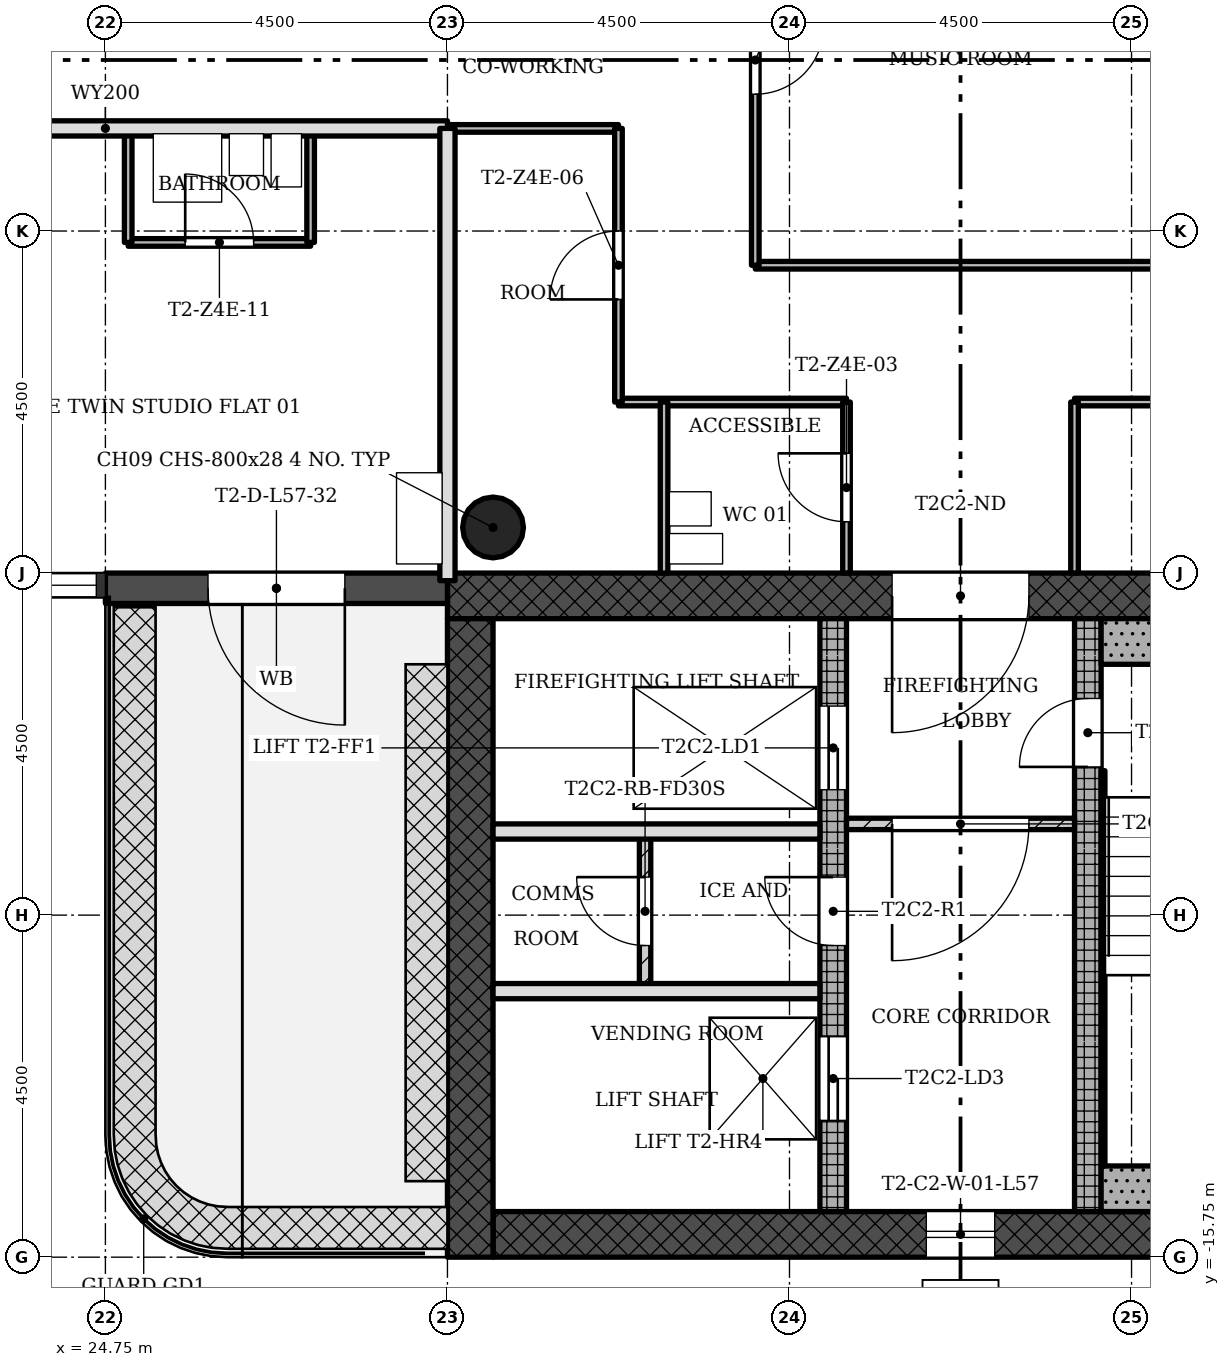
"""IFC4 building model, lengths in metres.
Left out: names, types, materials, properties, quantities, classifications, styles, units other than length and angle.
Written with IfcOpenShell. Run it as: python <this file> out.ifc"""

import sys

from ifc_helpers import new_model, si_unit, direction, frame, frame_2d, origin, origin_2d, place, context, subcontext, project, spatial, rectangle, hollow_circle, extrude, element, fill, save


model = new_model("IFC4")
c1 = context("Model", 3, precision=1e-05, world=origin(), true_north=direction((0.0, 1.0)))
c2 = subcontext(c1, "Body", "Model", "MODEL_VIEW")
j1 = project(units=[si_unit("LENGTHUNIT", "METRE"), si_unit("PLANEANGLEUNIT", "RADIAN")], contexts=[c1])
p1 = place(None, origin())
s1 = spatial("IfcSite", under=j1, at=p1, CompositionType="ELEMENT")
p2 = place(p1, origin())
s2 = spatial("IfcBuilding", under=s1, at=p2, CompositionType="ELEMENT")
p3 = place(p2, frame((0.0, 0.0, 206.2)))
s3 = spatial("IfcBuildingStorey", under=s2, at=p3, CompositionType="ELEMENT", Elevation=206.2)
p4 = place(p3, frame((29.85, -15.45, 0.0), z_axis=(0.0, 0.0, 1.0), x_axis=(1.0, 0.0, 0.0)))
e1 = element("IfcWall", 1, at=p4, inside=s3, PredefinedType="SHEAR", context=c2, shape_type="SweptSolid", body=[
    extrude(rectangle(XDim=12.9, YDim=0.6, at=frame_2d((6.45, 0.0))), origin(), (0.0, 0.0, 1.0), 3.4),
])
p5 = place(p4, frame((5.7, 0.0, 0.45)))
e2 = element("IfcOpeningElement", 2, at=p5, cuts=e1, PredefinedType="OPENING", context=c2, shape_type="SweptSolid", body=[
    extrude(rectangle(XDim=0.9, YDim=2.4, at=frame_2d((0.45, 1.2))), frame((0.0, 0.31, 0.0), z_axis=(0.0, -1.0, 0.0), x_axis=(1.0, 0.0, 0.0)), (0.0, 0.0, 1.0), 0.62),
])
p6 = place(p3, frame((42.15, -7.05, 0.0), z_axis=(0.0, 0.0, 1.0), x_axis=(-1.0, 0.0, 0.0)))
e3 = element("IfcWall", 3, at=p6, inside=s3, PredefinedType="SHEAR", context=c2, shape_type="SweptSolid", body=[
    extrude(rectangle(XDim=12.9, YDim=0.6, at=frame_2d((6.45, 0.0))), origin(), (0.0, 0.0, 1.0), 3.4),
])
p7 = place(p6, frame((5.25, 0.0, 0.0)))
e4 = element("IfcOpeningElement", 4, at=p7, cuts=e3, PredefinedType="OPENING", context=c2, shape_type="SweptSolid", body=[
    extrude(rectangle(XDim=1.8, YDim=2.1, at=frame_2d((0.9, 1.05))), frame((0.0, 0.31, 0.0), z_axis=(0.0, -1.0, 0.0), x_axis=(1.0, 0.0, 0.0)), (0.0, 0.0, 1.0), 0.62),
])
p8 = place(p3, frame((29.55, -7.35, 0.0), z_axis=(0.0, 0.0, 1.0), x_axis=(0.0, -1.0, 0.0)))
e5 = element("IfcWall", 5, at=p8, inside=s3, PredefinedType="SHEAR", context=c2, shape_type="SweptSolid", body=[
    extrude(rectangle(XDim=8.4, YDim=0.6, at=frame_2d((4.2, 0.0))), origin(), (0.0, 0.0, 1.0), 3.4),
])
p9 = place(p3, frame((34.325, -15.15, 0.0), z_axis=(0.0, 0.0, 1.0), x_axis=(0.0, 1.0, 0.0)))
e6 = element("IfcWall", 6, at=p9, inside=s3, PredefinedType="SHEAR", context=c2, shape_type="SweptSolid", body=[
    extrude(rectangle(XDim=7.8, YDim=0.35, at=frame_2d((3.9, 0.0))), origin(), (0.0, 0.0, 1.0), 3.4),
])
p10 = place(p9, frame((5.55, 0.0, 0.0)))
e7 = element("IfcOpeningElement", 7, at=p10, cuts=e6, PredefinedType="OPENING", context=c2, shape_type="SweptSolid", body=[
    extrude(rectangle(XDim=1.1, YDim=2.1, at=frame_2d((0.55, 1.05))), frame((0.0, 0.185, 0.0), z_axis=(0.0, -1.0, 0.0), x_axis=(1.0, 0.0, 0.0)), (0.0, 0.0, 1.0), 0.37),
])
p11 = place(p9, frame((1.2, 0.0, 0.0)))
e8 = element("IfcOpeningElement", 8, at=p11, cuts=e6, PredefinedType="OPENING", context=c2, shape_type="SweptSolid", body=[
    extrude(rectangle(XDim=1.1, YDim=2.1, at=frame_2d((0.55, 1.05))), frame((0.0, 0.185, 0.0), z_axis=(0.0, -1.0, 0.0), x_axis=(1.0, 0.0, 0.0)), (0.0, 0.0, 1.0), 0.37),
])
p12 = place(p9, frame((3.5, 0.0, 0.0)))
e9 = element("IfcOpeningElement", 9, at=p12, cuts=e6, PredefinedType="OPENING", context=c2, shape_type="SweptSolid", body=[
    extrude(rectangle(XDim=0.9, YDim=2.1, at=frame_2d((0.45, 1.05))), frame((0.0, 0.185, 0.0), z_axis=(0.0, -1.0, 0.0), x_axis=(1.0, 0.0, 0.0)), (0.0, 0.0, 1.0), 0.37),
])
p13 = place(p3, frame((37.675, -15.15, 0.0), z_axis=(0.0, 0.0, 1.0), x_axis=(0.0, 1.0, 0.0)))
e10 = element("IfcWall", 10, at=p13, inside=s3, PredefinedType="SHEAR", context=c2, shape_type="SweptSolid", body=[
    extrude(rectangle(XDim=7.8, YDim=0.35, at=frame_2d((3.9, 0.0))), origin(), (0.0, 0.0, 1.0), 3.4),
])
p14 = place(p13, frame((5.85, 0.0, 0.0)))
e11 = element("IfcOpeningElement", 11, at=p14, cuts=e10, PredefinedType="OPENING", context=c2, shape_type="SweptSolid", body=[
    extrude(rectangle(XDim=0.9, YDim=2.1, at=frame_2d((0.45, 1.05))), frame((0.0, 0.185, 0.0), z_axis=(0.0, -1.0, 0.0), x_axis=(1.0, 0.0, 0.0)), (0.0, 0.0, 1.0), 0.37),
])
p15 = place(p3, frame((29.85, -6.15, 0.0), z_axis=(0.0, 0.0, 1.0), x_axis=(1.0, 0.0, 0.0)))
e12 = element("IfcColumn", 12, at=p15, inside=s3, PredefinedType="COLUMN", context=c2, shape_type="SweptSolid", body=[
    extrude(hollow_circle(Radius=0.4, WallThickness=0.028, at=origin_2d()), origin(), (0.0, 0.0, 1.0), 3.4),
])
p16 = place(p3, frame((24.75, -6.95, -0.02), z_axis=(0.0, 0.0, 1.0), x_axis=(1.0, 0.0, 0.0)))
e13 = element("IfcWall", 13, at=p16, inside=s3, PredefinedType="STANDARD", context=c2, shape_type="SweptSolid", body=[
    extrude(rectangle(XDim=4.5, YDim=0.4, at=frame_2d((2.25, 0.0))), origin(), (0.0, 0.0, 1.0), 3.12),
])
p17 = place(p16, frame((1.35, 0.0, 0.02)))
e14 = element("IfcOpeningElement", 14, at=p17, cuts=e13, PredefinedType="OPENING", context=c2, shape_type="SweptSolid", body=[
    extrude(rectangle(XDim=1.8, YDim=2.1, at=frame_2d((0.9, 1.05))), frame((0.0, 0.21, 0.0), z_axis=(0.0, -1.0, 0.0), x_axis=(1.0, 0.0, 0.0)), (0.0, 0.0, 1.0), 0.42),
])
p18 = place(p3, frame((34.5, -10.05, 0.0), z_axis=(0.0, 0.0, 1.0), x_axis=(1.0, 0.0, 0.0)))
e15 = element("IfcWall", 15, at=p18, inside=s3, PredefinedType="PARTITIONING", context=c2, shape_type="SweptSolid", body=[
    extrude(rectangle(XDim=3.0, YDim=0.15, at=frame_2d((1.5, 0.0))), origin(), (0.0, 0.0, 1.0), 3.0),
])
p19 = place(p18, frame((0.6, 0.0, 0.0)))
e16 = element("IfcOpeningElement", 16, at=p19, cuts=e15, PredefinedType="OPENING", context=c2, shape_type="SweptSolid", body=[
    extrude(rectangle(XDim=1.8, YDim=2.1, at=frame_2d((0.9, 1.05))), frame((0.0, 0.085, 0.0), z_axis=(0.0, -1.0, 0.0), x_axis=(1.0, 0.0, 0.0)), (0.0, 0.0, 1.0), 0.17),
])
for number, where, z_axis, x_axis in (
    (17, (29.85, -12.25, 0.0), (0.0, 0.0, 1.0), (1.0, 0.0, 0.0)),
    (18, (29.85, -10.15, 0.0), (0.0, 0.0, 1.0), (1.0, 0.0, 0.0)),
):
    element("IfcWall", number, at=place(p3, frame(where, z_axis=z_axis, x_axis=x_axis)), inside=s3, PredefinedType="SOLIDWALL", context=c2, shape_type="SweptSolid", body=[
        extrude(rectangle(XDim=4.3, YDim=0.2, at=frame_2d((2.15, 0.0))), origin(), (0.0, 0.0, 1.0), 3.0),
    ])
p20 = place(p3, frame((31.85, -10.15, 0.0), z_axis=(0.0, 0.0, 1.0), x_axis=(0.0, -1.0, 0.0)))
e19 = element("IfcWall", 19, at=p20, inside=s3, PredefinedType="PARTITIONING", context=c2, shape_type="SweptSolid", body=[
    extrude(rectangle(XDim=2.1, YDim=0.15, at=frame_2d((1.05, 0.0))), origin(), (0.0, 0.0, 1.0), 3.0),
])
p21 = place(p20, frame((0.6, 0.0, 0.0)))
e20 = element("IfcOpeningElement", 20, at=p21, cuts=e19, PredefinedType="OPENING", context=c2, shape_type="SweptSolid", body=[
    extrude(rectangle(XDim=0.9, YDim=2.1, at=frame_2d((0.45, 1.05))), frame((0.0, 0.085, 0.0), z_axis=(0.0, -1.0, 0.0), x_axis=(1.0, 0.0, 0.0)), (0.0, 0.0, 1.0), 0.17),
])
for number, where, z_axis, x_axis in (
    (21, (40.5, -4.5, 0.0), (0.0, 0.0, 1.0), (-1.0, 0.0, 0.0)),
    (22, (34.5, -4.5, 0.0), (0.0, 0.0, 1.0), (-1.0, 0.0, 0.0)),
):
    element("IfcWall", number, at=place(p3, frame(where, z_axis=z_axis, x_axis=x_axis)), inside=s3, PredefinedType="PARTITIONING", context=c2, shape_type="SweptSolid", body=[
        extrude(rectangle(XDim=3.0, YDim=0.1, at=frame_2d((1.5, 0.0))), origin(), (0.0, 0.0, 1.0), 3.0),
    ])
p22 = place(p3, frame((38.7, -2.7, 0.0), z_axis=(0.0, 0.0, 1.0), x_axis=(-1.0, 0.0, 0.0)))
e23 = element("IfcWall", 23, at=p22, inside=s3, PredefinedType="PARTITIONING", context=c2, shape_type="SweptSolid", body=[
    extrude(rectangle(XDim=5.4, YDim=0.1, at=frame_2d((2.7, 0.0))), origin(), (0.0, 0.0, 1.0), 3.0),
])
p23 = place(p3, frame((27.45, -2.4, 0.0), z_axis=(0.0, 0.0, 1.0), x_axis=(-1.0, 0.0, 0.0)))
e24 = element("IfcWall", 24, at=p23, inside=s3, PredefinedType="PARTITIONING", context=c2, shape_type="SweptSolid", body=[
    extrude(rectangle(XDim=2.4, YDim=0.1, at=frame_2d((1.2, 0.0))), origin(), (0.0, 0.0, 1.0), 3.0),
])
p24 = place(p23, frame((0.75, 0.0, 0.0)))
e25 = element("IfcOpeningElement", 25, at=p24, cuts=e24, PredefinedType="OPENING", context=c2, shape_type="SweptSolid", body=[
    extrude(rectangle(XDim=0.9, YDim=2.1, at=frame_2d((0.45, 1.05))), frame((0.0, 0.06, 0.0), z_axis=(0.0, -1.0, 0.0), x_axis=(1.0, 0.0, 0.0)), (0.0, 0.0, 1.0), 0.12),
])
p25 = place(p3, frame((31.5, -0.9, 0.0), z_axis=(0.0, 0.0, 1.0), x_axis=(-1.0, 0.0, 0.0)))
e26 = element("IfcWall", 26, at=p25, inside=s3, PredefinedType="PARTITIONING", context=c2, shape_type="SweptSolid", body=[
    extrude(rectangle(XDim=2.25, YDim=0.1, at=frame_2d((1.125, 0.0))), origin(), (0.0, 0.0, 1.0), 3.0),
])
p26 = place(p3, frame((29.25, -0.9, 0.0), z_axis=(0.0, 0.0, 1.0), x_axis=(-1.0, 0.0, 0.0)))
e27 = element("IfcWall", 27, at=p26, inside=s3, PredefinedType="SOLIDWALL", context=c2, shape_type="SweptSolid", body=[
    extrude(rectangle(XDim=9.0, YDim=0.2, at=frame_2d((4.5, 0.0))), origin(), (0.0, 0.0, 1.0), 3.0),
])
p27 = place(p26, frame((6.15, 0.0, 0.0)))
e28 = element("IfcOpeningElement", 28, at=p27, cuts=e27, PredefinedType="OPENING", context=c2, shape_type="SweptSolid", body=[
    extrude(rectangle(XDim=0.9, YDim=2.1, at=frame_2d((0.45, 1.05))), frame((0.0, 0.11, 0.0), z_axis=(0.0, -1.0, 0.0), x_axis=(1.0, 0.0, 0.0)), (0.0, 0.0, 1.0), 0.22),
])
p28 = place(p3, frame((37.5, -6.75, 0.0), z_axis=(0.0, 0.0, 1.0), x_axis=(0.0, 1.0, 0.0)))
e29 = element("IfcWall", 29, at=p28, inside=s3, PredefinedType="PARTITIONING", context=c2, shape_type="SweptSolid", body=[
    extrude(rectangle(XDim=2.25, YDim=0.1, at=frame_2d((1.125, 0.0))), origin(), (0.0, 0.0, 1.0), 3.0),
])
p29 = place(p3, frame((34.5, -6.75, 0.0), z_axis=(0.0, 0.0, 1.0), x_axis=(0.0, 1.0, 0.0)))
e30 = element("IfcWall", 30, at=p29, inside=s3, PredefinedType="PARTITIONING", context=c2, shape_type="SweptSolid", body=[
    extrude(rectangle(XDim=2.25, YDim=0.1, at=frame_2d((1.125, 0.0))), origin(), (0.0, 0.0, 1.0), 3.0),
])
p30 = place(p29, frame((0.675, 0.0, 0.0)))
e31 = element("IfcOpeningElement", 31, at=p30, cuts=e30, PredefinedType="OPENING", context=c2, shape_type="SweptSolid", body=[
    extrude(rectangle(XDim=0.9, YDim=2.1, at=frame_2d((0.45, 1.05))), frame((0.0, 0.06, 0.0), z_axis=(0.0, -1.0, 0.0), x_axis=(1.0, 0.0, 0.0)), (0.0, 0.0, 1.0), 0.12),
])
p31 = place(p3, frame((33.3, -2.7, 0.0), z_axis=(0.0, 0.0, 1.0), x_axis=(0.0, 1.0, 0.0)))
e32 = element("IfcWall", 32, at=p31, inside=s3, PredefinedType="PARTITIONING", context=c2, shape_type="SweptSolid", body=[
    extrude(rectangle(XDim=5.4, YDim=0.1, at=frame_2d((2.7, 0.0))), origin(), (0.0, 0.0, 1.0), 3.0),
])
p32 = place(p31, frame((2.25, 0.0, 0.0)))
e33 = element("IfcOpeningElement", 33, at=p32, cuts=e32, PredefinedType="OPENING", context=c2, shape_type="SweptSolid", body=[
    extrude(rectangle(XDim=0.9, YDim=2.1, at=frame_2d((0.45, 1.05))), frame((0.0, 0.06, 0.0), z_axis=(0.0, -1.0, 0.0), x_axis=(1.0, 0.0, 0.0)), (0.0, 0.0, 1.0), 0.12),
])
p33 = place(p3, frame((32.1, -6.75, 0.0), z_axis=(0.0, 0.0, 1.0), x_axis=(0.0, 1.0, 0.0)))
e34 = element("IfcWall", 34, at=p33, inside=s3, PredefinedType="PARTITIONING", context=c2, shape_type="SweptSolid", body=[
    extrude(rectangle(XDim=2.25, YDim=0.1, at=frame_2d((1.125, 0.0))), origin(), (0.0, 0.0, 1.0), 3.0),
])
p34 = place(p3, frame((31.5, -4.5, 0.0), z_axis=(0.0, 0.0, 1.0), x_axis=(0.0, 1.0, 0.0)))
e35 = element("IfcWall", 35, at=p34, inside=s3, PredefinedType="PARTITIONING", context=c2, shape_type="SweptSolid", body=[
    extrude(rectangle(XDim=3.6, YDim=0.1, at=frame_2d((1.8, 0.0))), origin(), (0.0, 0.0, 1.0), 3.0),
])
p35 = place(p34, frame((1.35, 0.0, 0.0)))
e36 = element("IfcOpeningElement", 36, at=p35, cuts=e35, PredefinedType="OPENING", context=c2, shape_type="SweptSolid", body=[
    extrude(rectangle(XDim=0.9, YDim=2.1, at=frame_2d((0.45, 1.05))), frame((0.0, 0.06, 0.0), z_axis=(0.0, -1.0, 0.0), x_axis=(1.0, 0.0, 0.0)), (0.0, 0.0, 1.0), 0.12),
])
p36 = place(p3, frame((29.25, -6.85, 0.0), z_axis=(0.0, 0.0, 1.0), x_axis=(0.0, 1.0, 0.0)))
e37 = element("IfcWall", 37, at=p36, inside=s3, PredefinedType="SOLIDWALL", context=c2, shape_type="SweptSolid", body=[
    extrude(rectangle(XDim=5.95, YDim=0.2, at=frame_2d((2.975, 0.0))), origin(), (0.0, 0.0, 1.0), 3.0),
])
for number, where, z_axis, x_axis in (
    (38, (27.45, -2.4, 0.0), (0.0, 0.0, 1.0), (0.0, 1.0, 0.0)),
    (39, (25.05, -2.4, 0.0), (0.0, 0.0, 1.0), (0.0, 1.0, 0.0)),
):
    element("IfcWall", number, at=place(p3, frame(where, z_axis=z_axis, x_axis=x_axis)), inside=s3, PredefinedType="PARTITIONING", context=c2, shape_type="SweptSolid", body=[
        extrude(rectangle(XDim=1.5, YDim=0.1, at=frame_2d((0.75, 0.0))), origin(), (0.0, 0.0, 1.0), 3.0),
    ])
for number, where, z_axis, x_axis in (
    (40, (37.85, -14.85, 0.0), (0.0, 0.0, 1.0), (1.0, 0.0, 0.0)),
    (41, (37.85, -7.65, 0.0), (0.0, 0.0, 1.0), (1.0, 0.0, 0.0)),
):
    element("IfcWall", number, at=place(p3, frame(where, z_axis=z_axis, x_axis=x_axis)), inside=s3, PredefinedType="SHEAR", context=c2, shape_type="SweptSolid", body=[
        extrude(rectangle(XDim=4.3, YDim=0.6, at=frame_2d((2.15, 0.0))), origin(), (0.0, 0.0, 1.0), 3.4),
    ])
p37 = place(p3, frame((37.875, -9.35, 0.0), z_axis=(0.0, 0.0, 1.0), x_axis=(0.0, -1.0, 0.0)))
e42 = element("IfcWall", 42, at=p37, inside=s3, PredefinedType="SHEAR", context=c2, shape_type="SweptSolid", body=[
    extrude(rectangle(XDim=5.2, YDim=0.05, at=frame_2d((2.6, 0.0))), origin(), (0.0, 0.0, 1.0), 3.4),
])
p38 = place(p17, origin())
e43 = element("IfcDoor", 43, at=p38, inside=s3, OperationType="SINGLE_SWING_RIGHT", PredefinedType="DOOR", context=c2, shape_type="SweptSolid", body=[
    extrude(rectangle(XDim=1.8, YDim=2.1, at=frame_2d((0.9, 1.05))), frame((0.0, 0.025, 0.0), z_axis=(0.0, -1.0, 0.0), x_axis=(1.0, 0.0, 0.0)), (0.0, 0.0, 1.0), 0.05),
])
fill(e14, e43)
p39 = place(p5, origin())
e44 = element("IfcWindow", 44, at=p39, inside=s3, PartitioningType="SINGLE_PANEL", PredefinedType="WINDOW", context=c2, shape_type="SweptSolid", body=[
    extrude(rectangle(XDim=0.9, YDim=2.4, at=frame_2d((0.45, 1.2))), frame((0.0, 0.03, 0.0), z_axis=(0.0, -1.0, 0.0), x_axis=(1.0, 0.0, 0.0)), (0.0, 0.0, 1.0), 0.06),
])
fill(e2, e44)
p40 = place(p19, origin())
e45 = element("IfcDoor", 45, at=p40, inside=s3, OperationType="SINGLE_SWING_LEFT", PredefinedType="DOOR", context=c2, shape_type="SweptSolid", body=[
    extrude(rectangle(XDim=1.8, YDim=2.1, at=frame_2d((0.9, 1.05))), frame((0.0, 0.025, 0.0), z_axis=(0.0, -1.0, 0.0), x_axis=(1.0, 0.0, 0.0)), (0.0, 0.0, 1.0), 0.05),
])
fill(e16, e45)
p41 = place(p21, origin())
e46 = element("IfcDoor", 46, at=p41, inside=s3, OperationType="SINGLE_SWING_LEFT", PredefinedType="DOOR", context=c2, shape_type="SweptSolid", body=[
    extrude(rectangle(XDim=0.9, YDim=2.1, at=frame_2d((0.45, 1.05))), frame((0.0, 0.025, 0.0), z_axis=(0.0, -1.0, 0.0), x_axis=(1.0, 0.0, 0.0)), (0.0, 0.0, 1.0), 0.05),
])
fill(e20, e46)
p42 = place(p32, origin())
e47 = element("IfcDoor", 47, at=p42, inside=s3, OperationType="SINGLE_SWING_RIGHT", PredefinedType="DOOR", context=c2, shape_type="SweptSolid", body=[
    extrude(rectangle(XDim=0.9, YDim=2.1, at=frame_2d((0.45, 1.05))), frame((0.0, 0.025, 0.0), z_axis=(0.0, -1.0, 0.0), x_axis=(1.0, 0.0, 0.0)), (0.0, 0.0, 1.0), 0.05),
])
fill(e33, e47)
p43 = place(p30, origin())
e48 = element("IfcDoor", 48, at=p43, inside=s3, OperationType="SINGLE_SWING_LEFT", PredefinedType="DOOR", context=c2, shape_type="SweptSolid", body=[
    extrude(rectangle(XDim=0.9, YDim=2.1, at=frame_2d((0.45, 1.05))), frame((0.0, 0.025, 0.0), z_axis=(0.0, -1.0, 0.0), x_axis=(1.0, 0.0, 0.0)), (0.0, 0.0, 1.0), 0.05),
])
fill(e31, e48)
p44 = place(p35, origin())
e49 = element("IfcDoor", 49, at=p44, inside=s3, OperationType="SINGLE_SWING_RIGHT", PredefinedType="DOOR", context=c2, shape_type="SweptSolid", body=[
    extrude(rectangle(XDim=0.9, YDim=2.1, at=frame_2d((0.45, 1.05))), frame((0.0, 0.025, 0.0), z_axis=(0.0, -1.0, 0.0), x_axis=(1.0, 0.0, 0.0)), (0.0, 0.0, 1.0), 0.05),
])
fill(e36, e49)
p45 = place(p24, origin())
e50 = element("IfcDoor", 50, at=p45, inside=s3, OperationType="SINGLE_SWING_RIGHT", PredefinedType="DOOR", context=c2, shape_type="SweptSolid", body=[
    extrude(rectangle(XDim=0.9, YDim=2.1, at=frame_2d((0.45, 1.05))), frame((0.0, 0.025, 0.0), z_axis=(0.0, -1.0, 0.0), x_axis=(1.0, 0.0, 0.0)), (0.0, 0.0, 1.0), 0.05),
])
fill(e25, e50)
p46 = place(p14, origin())
e51 = element("IfcDoor", 51, at=p46, inside=s3, OperationType="SINGLE_SWING_RIGHT", PredefinedType="DOOR", context=c2, shape_type="SweptSolid", body=[
    extrude(rectangle(XDim=0.9, YDim=2.1, at=frame_2d((0.45, 1.05))), frame((0.0, 0.025, 0.0), z_axis=(0.0, -1.0, 0.0), x_axis=(1.0, 0.0, 0.0)), (0.0, 0.0, 1.0), 0.05),
])
fill(e11, e51)
p47 = place(p10, origin())
e52 = element("IfcDoor", 52, at=p47, inside=s3, OperationType="SLIDING_TO_LEFT", PredefinedType="DOOR", context=c2, shape_type="SweptSolid", body=[
    extrude(rectangle(XDim=1.1, YDim=2.1, at=frame_2d((0.55, 1.05))), frame((0.0, 0.025, 0.0), z_axis=(0.0, -1.0, 0.0), x_axis=(1.0, 0.0, 0.0)), (0.0, 0.0, 1.0), 0.05),
])
fill(e7, e52)
p48 = place(p11, origin())
e53 = element("IfcDoor", 53, at=p48, inside=s3, OperationType="SLIDING_TO_LEFT", PredefinedType="DOOR", context=c2, shape_type="SweptSolid", body=[
    extrude(rectangle(XDim=1.1, YDim=2.1, at=frame_2d((0.55, 1.05))), frame((0.0, 0.025, 0.0), z_axis=(0.0, -1.0, 0.0), x_axis=(1.0, 0.0, 0.0)), (0.0, 0.0, 1.0), 0.05),
])
fill(e8, e53)
p49 = place(p12, origin())
e54 = element("IfcDoor", 54, at=p49, inside=s3, OperationType="SINGLE_SWING_LEFT", PredefinedType="DOOR", context=c2, shape_type="SweptSolid", body=[
    extrude(rectangle(XDim=0.9, YDim=2.1, at=frame_2d((0.45, 1.05))), frame((0.0, 0.025, 0.0), z_axis=(0.0, -1.0, 0.0), x_axis=(1.0, 0.0, 0.0)), (0.0, 0.0, 1.0), 0.05),
])
fill(e9, e54)
p50 = place(p7, origin())
e55 = element("IfcDoor", 55, at=p50, inside=s3, OperationType="SINGLE_SWING_LEFT", PredefinedType="DOOR", context=c2, shape_type="SweptSolid", body=[
    extrude(rectangle(XDim=1.8, YDim=2.1, at=frame_2d((0.9, 1.05))), frame((0.0, 0.025, 0.0), z_axis=(0.0, -1.0, 0.0), x_axis=(1.0, 0.0, 0.0)), (0.0, 0.0, 1.0), 0.05),
])
fill(e4, e55)
save(model, sys.argv[1])
